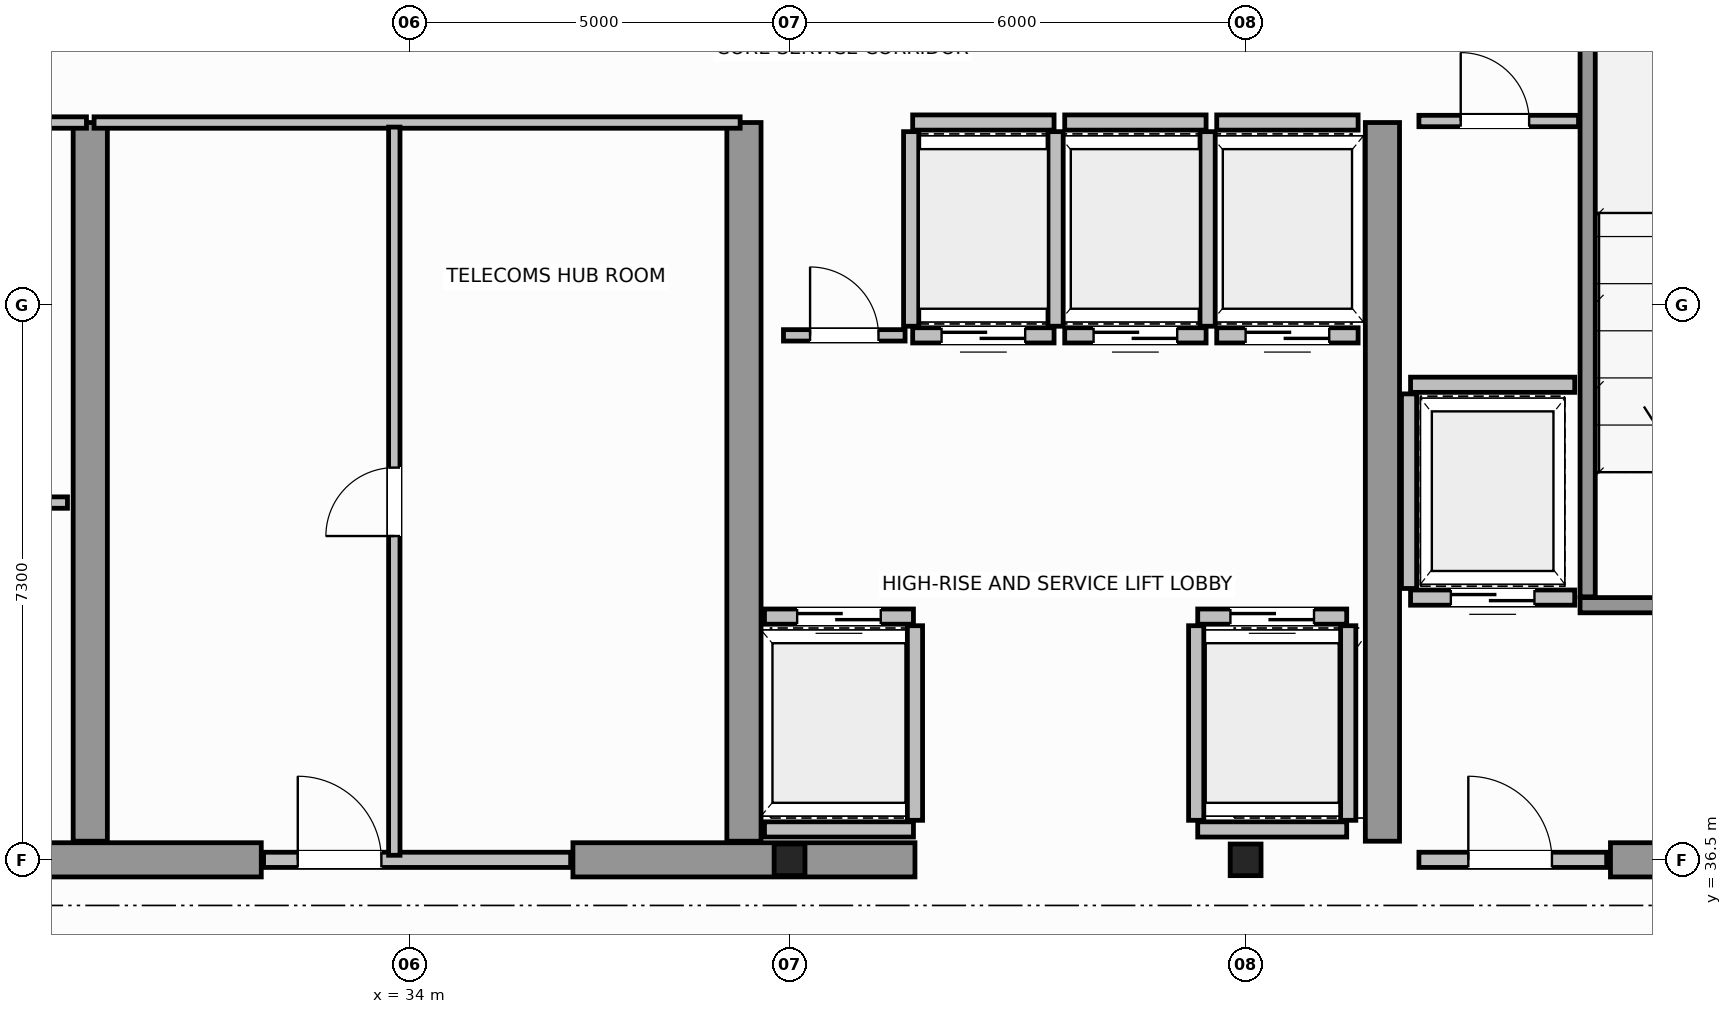
"""IFC4 building model, lengths in metres.
Left out: names, types, materials, properties, quantities, classifications, styles, units other than length and angle.
Written with IfcOpenShell. Run it as: python <this file> out.ifc"""

import sys

from ifc_helpers import new_model, si_unit, direction, frame, frame_2d, origin, origin_2d, place, context, subcontext, project, spatial, rectangle, i_section, extrude, source, transform, mapped, element, fill, save


model = new_model("IFC4")
c1 = context("Model", 3, precision=1e-05, world=origin(), true_north=direction((0.0, 1.0)))
c2 = subcontext(c1, "Body", "Model", "MODEL_VIEW")
j1 = project(units=[si_unit("LENGTHUNIT", "METRE"), si_unit("PLANEANGLEUNIT", "RADIAN")], contexts=[c1])
p1 = place(None, origin())
s1 = spatial("IfcSite", under=j1, at=p1, CompositionType="ELEMENT")
p2 = place(p1, origin())
s2 = spatial("IfcBuilding", under=s1, at=p2, CompositionType="ELEMENT")
p3 = place(p2, frame((0.0, 0.0, 287.8)))
s3 = spatial("IfcBuildingStorey", under=s2, at=p3, CompositionType="ELEMENT", Elevation=287.8)
m1 = source(origin(), c2, "Body", "SweptSolid", [
    extrude(i_section(OverallWidth=0.406, OverallDepth=0.416, WebThickness=0.03, FlangeThickness=0.042, FilletRadius=0.015, at=origin_2d()), origin(), (0.0, 0.0, 1.0), 3.8),
])
for number, where, z_axis, x_axis in (
    (1, (39.0, 36.5, 0.0), (0.0, 0.0, 1.0), (1.0, 0.0, 0.0)),
    (2, (45.0, 36.5, 0.0), (0.0, 0.0, 1.0), (1.0, 0.0, 0.0)),
):
    element("IfcColumn", number, at=place(p3, frame(where, z_axis=z_axis, x_axis=x_axis)), inside=s3, PredefinedType="COLUMN", context=c2, shape_type="MappedRepresentation", body=[
        mapped(m1, transform((0.0, 0.0, 0.0), scale=1.0)),
    ])
for number, where, z_axis, x_axis in (
    (3, (27.55, 36.5, 0.0), (0.0, 0.0, 1.0), (1.0, 0.0, 0.0)),
    (4, (36.15, 36.5, 0.0), (0.0, 0.0, 1.0), (1.0, 0.0, 0.0)),
):
    element("IfcWall", number, at=place(p3, frame(where, z_axis=z_axis, x_axis=x_axis)), inside=s3, PredefinedType="SHEAR", context=c2, shape_type="SweptSolid", body=[
        extrude(rectangle(XDim=4.5, YDim=0.45, at=frame_2d((2.25, 0.0))), origin(), (0.0, 0.0, 1.0), 3.8),
    ])
p4 = place(p3, frame((49.8, 36.5, 0.0), z_axis=(0.0, 0.0, 1.0), x_axis=(1.0, 0.0, 0.0)))
e5 = element("IfcWall", 5, at=p4, inside=s3, PredefinedType="SHEAR", context=c2, shape_type="SweptSolid", body=[
    extrude(rectangle(XDim=3.955, YDim=0.45, at=frame_2d((1.978, 0.0))), origin(), (0.0, 0.0, 1.0), 2.58),
])
for number, where, z_axis, x_axis in (
    (6, (29.8, 36.745, 0.0), (0.0, 0.0, 1.0), (0.0, 1.0, 0.0)),
    (7, (38.4, 36.745, 0.0), (0.0, 0.0, 1.0), (0.0, 1.0, 0.0)),
    (8, (46.8, 36.745, 0.0), (0.0, 0.0, 1.0), (0.0, 1.0, 0.0)),
):
    element("IfcWall", number, at=place(p3, frame(where, z_axis=z_axis, x_axis=x_axis)), inside=s3, PredefinedType="SHEAR", context=c2, shape_type="SweptSolid", body=[
        extrude(rectangle(XDim=9.455, YDim=0.45, at=frame_2d((4.728, 0.0))), origin(), (0.0, 0.0, 1.0), 3.8),
    ])
p5 = place(p3, frame((49.4, 39.85, 0.0), z_axis=(0.0, 0.0, 1.0), x_axis=(1.0, 0.0, 0.0)))
e9 = element("IfcWall", 9, at=p5, inside=s3, PredefinedType="SOLIDWALL", context=c2, shape_type="SweptSolid", body=[
    extrude(rectangle(XDim=4.375, YDim=0.2, at=frame_2d((2.188, 0.0))), origin(), (0.0, 0.0, 1.0), 3.8),
])
p6 = place(p5, frame((1.325, 0.0, 0.0)))
e10 = element("IfcOpeningElement", 10, at=p6, cuts=e9, PredefinedType="OPENING", context=c2, shape_type="SweptSolid", body=[
    extrude(rectangle(XDim=1.1, YDim=2.15, at=frame_2d((0.55, 1.075))), frame((0.0, 0.11, 0.0), z_axis=(0.0, -1.0, 0.0), x_axis=(1.0, 0.0, 0.0)), (0.0, 0.0, 1.0), 0.22),
])
p7 = place(p3, frame((49.5, 39.96, 0.0), z_axis=(0.0, 0.0, 1.0), x_axis=(0.0, 1.0, 0.0)))
e11 = element("IfcWall", 11, at=p7, inside=s3, PredefinedType="SOLIDWALL", context=c2, shape_type="SweptSolid", body=[
    extrude(rectangle(XDim=9.93, YDim=0.2, at=frame_2d((4.965, 0.0))), origin(), (0.0, 0.0, 1.0), 3.8),
])
p8 = place(p3, frame((47.28, 36.5, 0.0), z_axis=(0.0, 0.0, 1.0), x_axis=(1.0, 0.0, 0.0)))
e12 = element("IfcWall", 12, at=p8, inside=s3, PredefinedType="SOLIDWALL", context=c2, shape_type="SweptSolid", body=[
    extrude(rectangle(XDim=2.47, YDim=0.2, at=frame_2d((1.235, 0.0))), origin(), (0.0, 0.0, 1.0), 2.57),
])
p9 = place(p8, frame((0.65, 0.0, 0.0)))
e13 = element("IfcOpeningElement", 13, at=p9, cuts=e12, PredefinedType="OPENING", context=c2, shape_type="SweptSolid", body=[
    extrude(rectangle(XDim=1.1, YDim=2.15, at=frame_2d((0.55, 1.075))), frame((0.0, 0.11, 0.0), z_axis=(0.0, -1.0, 0.0), x_axis=(1.0, 0.0, 0.0)), (0.0, 0.0, 1.0), 0.22),
])
p10 = place(p3, frame((38.67, 39.7, 0.0), z_axis=(0.0, 0.0, 1.0), x_axis=(1.0, 0.0, 0.0)))
e14 = element("IfcWall", 14, at=p10, inside=s3, PredefinedType="SOLIDWALL", context=c2, shape_type="SweptSolid", body=[
    extrude(rectangle(XDim=1.96, YDim=0.2, at=frame_2d((0.98, 0.0))), origin(), (0.0, 0.0, 1.0), 3.58),
])
p11 = place(p10, frame((0.43, 0.0, 0.0)))
e15 = element("IfcOpeningElement", 15, at=p11, cuts=e14, PredefinedType="OPENING", context=c2, shape_type="SweptSolid", body=[
    extrude(rectangle(XDim=1.1, YDim=2.15, at=frame_2d((0.55, 1.075))), frame((0.0, 0.11, 0.0), z_axis=(0.0, -1.0, 0.0), x_axis=(1.0, 0.0, 0.0)), (0.0, 0.0, 1.0), 0.22),
])
p12 = place(p3, frame((38.67, 36.9, 0.0), z_axis=(0.0, 0.0, 1.0), x_axis=(1.0, 0.0, 0.0)))
e16 = element("IfcWall", 16, at=p12, inside=s3, PredefinedType="SOLIDWALL", context=c2, shape_type="SweptSolid", body=[
    extrude(rectangle(XDim=1.96, YDim=0.2, at=frame_2d((0.98, 0.0))), origin(), (0.0, 0.0, 1.0), 3.58),
])
p13 = place(p3, frame((40.65, 37.02, 0.0), z_axis=(0.0, 0.0, 1.0), x_axis=(0.0, 1.0, 0.0)))
e17 = element("IfcWall", 17, at=p13, inside=s3, PredefinedType="SOLIDWALL", context=c2, shape_type="SweptSolid", body=[
    extrude(rectangle(XDim=2.56, YDim=0.2, at=frame_2d((1.28, 0.0))), origin(), (0.0, 0.0, 1.0), 3.58),
])
p14 = place(p3, frame((44.37, 39.7, 0.0), z_axis=(0.0, 0.0, 1.0), x_axis=(1.0, 0.0, 0.0)))
e18 = element("IfcWall", 18, at=p14, inside=s3, PredefinedType="SOLIDWALL", context=c2, shape_type="SweptSolid", body=[
    extrude(rectangle(XDim=1.96, YDim=0.2, at=frame_2d((0.98, 0.0))), origin(), (0.0, 0.0, 1.0), 3.58),
])
p15 = place(p14, frame((0.43, 0.0, 0.0)))
e19 = element("IfcOpeningElement", 19, at=p15, cuts=e18, PredefinedType="OPENING", context=c2, shape_type="SweptSolid", body=[
    extrude(rectangle(XDim=1.1, YDim=2.15, at=frame_2d((0.55, 1.075))), frame((0.0, 0.11, 0.0), z_axis=(0.0, -1.0, 0.0), x_axis=(1.0, 0.0, 0.0)), (0.0, 0.0, 1.0), 0.22),
])
p16 = place(p3, frame((44.37, 36.9, 0.0), z_axis=(0.0, 0.0, 1.0), x_axis=(1.0, 0.0, 0.0)))
e20 = element("IfcWall", 20, at=p16, inside=s3, PredefinedType="SOLIDWALL", context=c2, shape_type="SweptSolid", body=[
    extrude(rectangle(XDim=1.96, YDim=0.2, at=frame_2d((0.98, 0.0))), origin(), (0.0, 0.0, 1.0), 2.57),
])
for number, where, z_axis, x_axis in (
    (21, (44.35, 37.02, 0.0), (0.0, 0.0, 1.0), (0.0, 1.0, 0.0)),
    (22, (46.35, 37.02, 0.0), (0.0, 0.0, 1.0), (0.0, 1.0, 0.0)),
):
    element("IfcWall", number, at=place(p3, frame(where, z_axis=z_axis, x_axis=x_axis)), inside=s3, PredefinedType="SOLIDWALL", context=c2, shape_type="SweptSolid", body=[
        extrude(rectangle(XDim=2.56, YDim=0.2, at=frame_2d((1.28, 0.0))), origin(), (0.0, 0.0, 1.0), 3.58),
    ])
p17 = place(p3, frame((40.62, 43.4, 0.0), z_axis=(0.0, 0.0, 1.0), x_axis=(1.0, 0.0, 0.0)))
e23 = element("IfcWall", 23, at=p17, inside=s3, PredefinedType="SOLIDWALL", context=c2, shape_type="SweptSolid", body=[
    extrude(rectangle(XDim=1.86, YDim=0.2, at=frame_2d((0.93, 0.0))), origin(), (0.0, 0.0, 1.0), 3.58),
])
p18 = place(p17, frame((0.38, 0.0, 0.0)))
e24 = element("IfcOpeningElement", 24, at=p18, cuts=e23, PredefinedType="OPENING", context=c2, shape_type="SweptSolid", body=[
    extrude(rectangle(XDim=1.1, YDim=2.15, at=frame_2d((0.55, 1.075))), frame((0.0, 0.11, 0.0), z_axis=(0.0, -1.0, 0.0), x_axis=(1.0, 0.0, 0.0)), (0.0, 0.0, 1.0), 0.22),
])
p19 = place(p3, frame((40.62, 46.2, 0.0), z_axis=(0.0, 0.0, 1.0), x_axis=(1.0, 0.0, 0.0)))
e25 = element("IfcWall", 25, at=p19, inside=s3, PredefinedType="SOLIDWALL", context=c2, shape_type="SweptSolid", body=[
    extrude(rectangle(XDim=1.86, YDim=0.2, at=frame_2d((0.93, 0.0))), origin(), (0.0, 0.0, 1.0), 3.58),
])
for number, where, z_axis, x_axis in (
    (26, (40.6, 43.52, 0.0), (0.0, 0.0, 1.0), (0.0, 1.0, 0.0)),
    (27, (42.5, 43.52, 0.0), (0.0, 0.0, 1.0), (0.0, 1.0, 0.0)),
):
    element("IfcWall", number, at=place(p3, frame(where, z_axis=z_axis, x_axis=x_axis)), inside=s3, PredefinedType="SOLIDWALL", context=c2, shape_type="SweptSolid", body=[
        extrude(rectangle(XDim=2.56, YDim=0.2, at=frame_2d((1.28, 0.0))), origin(), (0.0, 0.0, 1.0), 3.58),
    ])
p20 = place(p3, frame((42.62, 43.4, 0.0), z_axis=(0.0, 0.0, 1.0), x_axis=(1.0, 0.0, 0.0)))
e28 = element("IfcWall", 28, at=p20, inside=s3, PredefinedType="SOLIDWALL", context=c2, shape_type="SweptSolid", body=[
    extrude(rectangle(XDim=1.86, YDim=0.2, at=frame_2d((0.93, 0.0))), origin(), (0.0, 0.0, 1.0), 3.58),
])
p21 = place(p20, frame((0.38, 0.0, 0.0)))
e29 = element("IfcOpeningElement", 29, at=p21, cuts=e28, PredefinedType="OPENING", context=c2, shape_type="SweptSolid", body=[
    extrude(rectangle(XDim=1.1, YDim=2.15, at=frame_2d((0.55, 1.075))), frame((0.0, 0.11, 0.0), z_axis=(0.0, -1.0, 0.0), x_axis=(1.0, 0.0, 0.0)), (0.0, 0.0, 1.0), 0.22),
])
p22 = place(p3, frame((42.62, 46.2, 0.0), z_axis=(0.0, 0.0, 1.0), x_axis=(1.0, 0.0, 0.0)))
e30 = element("IfcWall", 30, at=p22, inside=s3, PredefinedType="SOLIDWALL", context=c2, shape_type="SweptSolid", body=[
    extrude(rectangle(XDim=1.86, YDim=0.2, at=frame_2d((0.93, 0.0))), origin(), (0.0, 0.0, 1.0), 3.58),
])
p23 = place(p3, frame((44.5, 43.52, 0.0), z_axis=(0.0, 0.0, 1.0), x_axis=(0.0, 1.0, 0.0)))
e31 = element("IfcWall", 31, at=p23, inside=s3, PredefinedType="SOLIDWALL", context=c2, shape_type="SweptSolid", body=[
    extrude(rectangle(XDim=2.56, YDim=0.2, at=frame_2d((1.28, 0.0))), origin(), (0.0, 0.0, 1.0), 3.58),
])
p24 = place(p3, frame((44.62, 43.4, 0.0), z_axis=(0.0, 0.0, 1.0), x_axis=(1.0, 0.0, 0.0)))
e32 = element("IfcWall", 32, at=p24, inside=s3, PredefinedType="SOLIDWALL", context=c2, shape_type="SweptSolid", body=[
    extrude(rectangle(XDim=1.86, YDim=0.2, at=frame_2d((0.93, 0.0))), origin(), (0.0, 0.0, 1.0), 3.58),
])
p25 = place(p24, frame((0.38, 0.0, 0.0)))
e33 = element("IfcOpeningElement", 33, at=p25, cuts=e32, PredefinedType="OPENING", context=c2, shape_type="SweptSolid", body=[
    extrude(rectangle(XDim=1.1, YDim=2.15, at=frame_2d((0.55, 1.075))), frame((0.0, 0.11, 0.0), z_axis=(0.0, -1.0, 0.0), x_axis=(1.0, 0.0, 0.0)), (0.0, 0.0, 1.0), 0.22),
])
p26 = place(p3, frame((44.62, 46.2, 0.0), z_axis=(0.0, 0.0, 1.0), x_axis=(1.0, 0.0, 0.0)))
e34 = element("IfcWall", 34, at=p26, inside=s3, PredefinedType="SOLIDWALL", context=c2, shape_type="SweptSolid", body=[
    extrude(rectangle(XDim=1.86, YDim=0.2, at=frame_2d((0.93, 0.0))), origin(), (0.0, 0.0, 1.0), 3.58),
])
p27 = place(p3, frame((47.17, 39.95, 0.0), z_axis=(0.0, 0.0, 1.0), x_axis=(1.0, 0.0, 0.0)))
e35 = element("IfcWall", 35, at=p27, inside=s3, PredefinedType="SOLIDWALL", context=c2, shape_type="SweptSolid", body=[
    extrude(rectangle(XDim=2.16, YDim=0.2, at=frame_2d((1.08, 0.0))), origin(), (0.0, 0.0, 1.0), 3.58),
])
p28 = place(p27, frame((0.53, 0.0, 0.0)))
e36 = element("IfcOpeningElement", 36, at=p28, cuts=e35, PredefinedType="OPENING", context=c2, shape_type="SweptSolid", body=[
    extrude(rectangle(XDim=1.1, YDim=2.15, at=frame_2d((0.55, 1.075))), frame((0.0, 0.11, 0.0), z_axis=(0.0, -1.0, 0.0), x_axis=(1.0, 0.0, 0.0)), (0.0, 0.0, 1.0), 0.22),
])
p29 = place(p3, frame((47.17, 42.75, 0.0), z_axis=(0.0, 0.0, 1.0), x_axis=(1.0, 0.0, 0.0)))
e37 = element("IfcWall", 37, at=p29, inside=s3, PredefinedType="SOLIDWALL", context=c2, shape_type="SweptSolid", body=[
    extrude(rectangle(XDim=2.16, YDim=0.2, at=frame_2d((1.08, 0.0))), origin(), (0.0, 0.0, 1.0), 3.58),
])
p30 = place(p3, frame((47.15, 40.07, 0.0), z_axis=(0.0, 0.0, 1.0), x_axis=(0.0, 1.0, 0.0)))
e38 = element("IfcWall", 38, at=p30, inside=s3, PredefinedType="SOLIDWALL", context=c2, shape_type="SweptSolid", body=[
    extrude(rectangle(XDim=2.56, YDim=0.2, at=frame_2d((1.28, 0.0))), origin(), (0.0, 0.0, 1.0), 3.58),
])
p31 = place(p3, frame((21.25, 46.2, 0.0), z_axis=(0.0, 0.0, 1.0), x_axis=(1.0, 0.0, 0.0)))
e39 = element("IfcWall", 39, at=p31, inside=s3, PredefinedType="PARTITIONING", context=c2, shape_type="SweptSolid", body=[
    extrude(rectangle(XDim=8.5, YDim=0.15, at=frame_2d((4.25, 0.0))), origin(), (0.0, 0.0, 1.0), 3.58),
])
p32 = place(p3, frame((21.5, 41.2, 0.0), z_axis=(0.0, 0.0, 1.0), x_axis=(1.0, 0.0, 0.0)))
e40 = element("IfcWall", 40, at=p32, inside=s3, PredefinedType="PARTITIONING", context=c2, shape_type="SweptSolid", body=[
    extrude(rectangle(XDim=8.0, YDim=0.15, at=frame_2d((4.0, 0.0))), origin(), (0.0, 0.0, 1.0), 3.58),
])
p33 = place(p32, frame((3.4, 0.0, 0.0)))
e41 = element("IfcOpeningElement", 41, at=p33, cuts=e40, PredefinedType="OPENING", context=c2, shape_type="SweptSolid", body=[
    extrude(rectangle(XDim=0.9, YDim=2.1, at=frame_2d((0.45, 1.05))), frame((0.0, 0.085, 0.0), z_axis=(0.0, -1.0, 0.0), x_axis=(1.0, 0.0, 0.0)), (0.0, 0.0, 1.0), 0.17),
])
p34 = place(p3, frame((32.08, 36.5, 0.0), z_axis=(0.0, 0.0, 1.0), x_axis=(1.0, 0.0, 0.0)))
e42 = element("IfcWall", 42, at=p34, inside=s3, PredefinedType="SOLIDWALL", context=c2, shape_type="SweptSolid", body=[
    extrude(rectangle(XDim=4.04, YDim=0.2, at=frame_2d((2.02, 0.0))), origin(), (0.0, 0.0, 1.0), 3.12),
])
p35 = place(p34, frame((0.45, 0.0, 0.0)))
e43 = element("IfcOpeningElement", 43, at=p35, cuts=e42, PredefinedType="OPENING", context=c2, shape_type="SweptSolid", body=[
    extrude(rectangle(XDim=1.1, YDim=2.15, at=frame_2d((0.55, 1.075))), frame((0.0, 0.11, 0.0), z_axis=(0.0, -1.0, 0.0), x_axis=(1.0, 0.0, 0.0)), (0.0, 0.0, 1.0), 0.22),
])
p36 = place(p3, frame((29.85, 46.2, 0.0), z_axis=(0.0, 0.0, 1.0), x_axis=(1.0, 0.0, 0.0)))
e44 = element("IfcWall", 44, at=p36, inside=s3, PredefinedType="PARTITIONING", context=c2, shape_type="SweptSolid", body=[
    extrude(rectangle(XDim=8.5, YDim=0.15, at=frame_2d((4.25, 0.0))), origin(), (0.0, 0.0, 1.0), 3.58),
])
p37 = place(p3, frame((33.8, 36.56, 0.0), z_axis=(0.0, 0.0, 1.0), x_axis=(0.0, 1.0, 0.0)))
e45 = element("IfcWall", 45, at=p37, inside=s3, PredefinedType="PARTITIONING", context=c2, shape_type="SweptSolid", body=[
    extrude(rectangle(XDim=9.58, YDim=0.15, at=frame_2d((4.79, 0.0))), origin(), (0.0, 0.0, 1.0), 3.58),
])
p38 = place(p37, frame((4.2, 0.0, 0.0)))
e46 = element("IfcOpeningElement", 46, at=p38, cuts=e45, PredefinedType="OPENING", context=c2, shape_type="SweptSolid", body=[
    extrude(rectangle(XDim=0.9, YDim=2.1, at=frame_2d((0.45, 1.05))), frame((0.0, 0.085, 0.0), z_axis=(0.0, -1.0, 0.0), x_axis=(1.0, 0.0, 0.0)), (0.0, 0.0, 1.0), 0.17),
])
p39 = place(p3, frame((47.28, 46.22, 0.0), z_axis=(0.0, 0.0, 1.0), x_axis=(1.0, 0.0, 0.0)))
e47 = element("IfcWall", 47, at=p39, inside=s3, PredefinedType="PARTITIONING", context=c2, shape_type="SweptSolid", body=[
    extrude(rectangle(XDim=2.1, YDim=0.15, at=frame_2d((1.05, 0.0))), origin(), (0.0, 0.0, 1.0), 3.58),
])
p40 = place(p39, frame((0.55, 0.0, 0.0)))
e48 = element("IfcOpeningElement", 48, at=p40, cuts=e47, PredefinedType="OPENING", context=c2, shape_type="SweptSolid", body=[
    extrude(rectangle(XDim=0.9, YDim=2.1, at=frame_2d((0.45, 1.05))), frame((0.0, 0.085, 0.0), z_axis=(0.0, -1.0, 0.0), x_axis=(1.0, 0.0, 0.0)), (0.0, 0.0, 1.0), 0.17),
])
p41 = place(p3, frame((38.92, 43.4, 0.0), z_axis=(0.0, 0.0, 1.0), x_axis=(1.0, 0.0, 0.0)))
e49 = element("IfcWall", 49, at=p41, inside=s3, PredefinedType="PARTITIONING", context=c2, shape_type="SweptSolid", body=[
    extrude(rectangle(XDim=1.6, YDim=0.15, at=frame_2d((0.8, 0.0))), origin(), (0.0, 0.0, 1.0), 3.58),
])
p42 = place(p41, frame((0.35, 0.0, 0.0)))
e50 = element("IfcOpeningElement", 50, at=p42, cuts=e49, PredefinedType="OPENING", context=c2, shape_type="SweptSolid", body=[
    extrude(rectangle(XDim=0.9, YDim=2.1, at=frame_2d((0.45, 1.05))), frame((0.0, 0.085, 0.0), z_axis=(0.0, -1.0, 0.0), x_axis=(1.0, 0.0, 0.0)), (0.0, 0.0, 1.0), 0.17),
])
m2 = source(origin(), c2, "Body", "SweptSolid", [
    extrude(rectangle(XDim=1.1, YDim=2.15, at=frame_2d((0.55, 1.075))), frame((0.0, 0.025, 0.0), z_axis=(0.0, -1.0, 0.0), x_axis=(1.0, 0.0, 0.0)), (0.0, 0.0, 1.0), 0.05),
])
p43 = place(p9, origin())
e51 = element("IfcDoor", 51, at=p43, inside=s3, OperationType="SINGLE_SWING_LEFT", PredefinedType="DOOR", context=c2, shape_type="MappedRepresentation", body=[
    mapped(m2, transform((0.0, 0.0, 0.0), scale=1.0)),
])
fill(e13, e51)
p44 = place(p11, origin())
e52 = element("IfcDoor", 52, at=p44, inside=s3, OperationType="DOUBLE_DOOR_SLIDING", PredefinedType="DOOR", context=c2, shape_type="MappedRepresentation", body=[
    mapped(m2, transform((0.0, 0.0, 0.0), scale=1.0)),
])
fill(e15, e52)
p45 = place(p15, origin())
e53 = element("IfcDoor", 53, at=p45, inside=s3, OperationType="DOUBLE_DOOR_SLIDING", PredefinedType="DOOR", context=c2, shape_type="MappedRepresentation", body=[
    mapped(m2, transform((0.0, 0.0, 0.0), scale=1.0)),
])
fill(e19, e53)
p46 = place(p18, origin())
e54 = element("IfcDoor", 54, at=p46, inside=s3, OperationType="DOUBLE_DOOR_SLIDING", PredefinedType="DOOR", context=c2, shape_type="MappedRepresentation", body=[
    mapped(m2, transform((0.0, 0.0, 0.0), scale=1.0)),
])
fill(e24, e54)
p47 = place(p21, origin())
e55 = element("IfcDoor", 55, at=p47, inside=s3, OperationType="DOUBLE_DOOR_SLIDING", PredefinedType="DOOR", context=c2, shape_type="MappedRepresentation", body=[
    mapped(m2, transform((0.0, 0.0, 0.0), scale=1.0)),
])
fill(e29, e55)
p48 = place(p25, origin())
e56 = element("IfcDoor", 56, at=p48, inside=s3, OperationType="DOUBLE_DOOR_SLIDING", PredefinedType="DOOR", context=c2, shape_type="MappedRepresentation", body=[
    mapped(m2, transform((0.0, 0.0, 0.0), scale=1.0)),
])
fill(e33, e56)
p49 = place(p28, origin())
e57 = element("IfcDoor", 57, at=p49, inside=s3, OperationType="DOUBLE_DOOR_SLIDING", PredefinedType="DOOR", context=c2, shape_type="MappedRepresentation", body=[
    mapped(m2, transform((0.0, 0.0, 0.0), scale=1.0)),
])
fill(e36, e57)
p50 = place(p35, origin())
e58 = element("IfcDoor", 58, at=p50, inside=s3, OperationType="SINGLE_SWING_LEFT", PredefinedType="DOOR", context=c2, shape_type="MappedRepresentation", body=[
    mapped(m2, transform((0.0, 0.0, 0.0), scale=1.0)),
])
fill(e43, e58)
m3 = source(origin(), c2, "Body", "SweptSolid", [
    extrude(rectangle(XDim=0.9, YDim=2.1, at=frame_2d((0.45, 1.05))), frame((0.0, 0.025, 0.0), z_axis=(0.0, -1.0, 0.0), x_axis=(1.0, 0.0, 0.0)), (0.0, 0.0, 1.0), 0.05),
])
p51 = place(p38, origin())
e59 = element("IfcDoor", 59, at=p51, inside=s3, OperationType="SINGLE_SWING_RIGHT", PredefinedType="DOOR", context=c2, shape_type="MappedRepresentation", body=[
    mapped(m3, transform((0.0, 0.0, 0.0), scale=1.0)),
])
fill(e46, e59)
p52 = place(p40, origin())
e60 = element("IfcDoor", 60, at=p52, inside=s3, OperationType="SINGLE_SWING_RIGHT", PredefinedType="DOOR", context=c2, shape_type="MappedRepresentation", body=[
    mapped(m3, transform((0.0, 0.0, 0.0), scale=1.0)),
])
fill(e48, e60)
p53 = place(p42, origin())
e61 = element("IfcDoor", 61, at=p53, inside=s3, OperationType="SINGLE_SWING_LEFT", PredefinedType="DOOR", context=c2, shape_type="MappedRepresentation", body=[
    mapped(m3, transform((0.0, 0.0, 0.0), scale=1.0)),
])
fill(e50, e61)
save(model, sys.argv[1])
